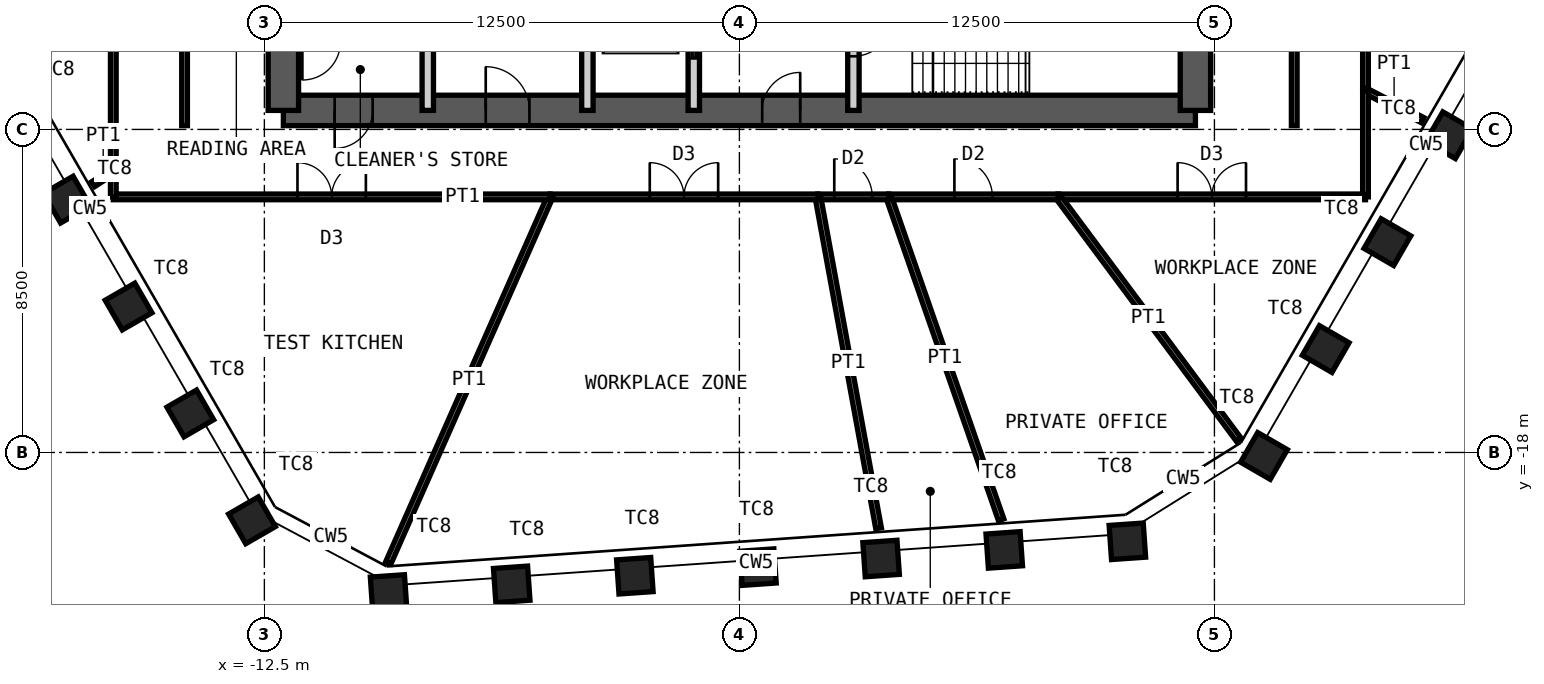
"""IFC4 building model, lengths in metres.
Left out: names, types, materials, properties, quantities, classifications, styles, units other than length and angle.
Written with IfcOpenShell. Run it as: python <this file> out.ifc"""

import sys

from ifc_helpers import new_model, si_unit, direction, frame, frame_2d, origin, origin_2d, place, context, subcontext, project, spatial, rectangle, hollow_rectangle, extrude, element, fill, save


model = new_model("IFC4")
c1 = context("Model", 3, precision=1e-05, world=origin(), true_north=direction((0.0, 1.0)))
c2 = subcontext(c1, "Body", "Model", "MODEL_VIEW")
j1 = project(units=[si_unit("LENGTHUNIT", "METRE"), si_unit("PLANEANGLEUNIT", "RADIAN")], contexts=[c1])
p1 = place(None, origin())
s1 = spatial("IfcSite", under=j1, at=p1, CompositionType="ELEMENT")
p2 = place(p1, origin())
s2 = spatial("IfcBuilding", under=s1, at=p2, CompositionType="ELEMENT")
p3 = place(p2, frame((0.0, 0.0, 312.4)))
s3 = spatial("IfcBuildingStorey", under=s2, at=p3, CompositionType="ELEMENT", Elevation=312.4)
for number, where, z_axis, x_axis in (
    (1, (18.676, -9.653, 0.0), (0.0, 0.0, 1.0), (0.5, 0.866, 0.0)),
    (2, (17.052, -12.466, 0.0), (0.0, 0.0, 1.0), (0.5, 0.866, 0.0)),
    (3, (15.427, -15.279, 0.0), (0.0, 0.0, 1.0), (0.5, 0.866, 0.0)),
    (4, (13.803, -18.092, 0.0), (0.0, 0.0, 1.0), (0.5, 0.866, 0.0)),
    (5, (10.209, -20.337, 0.0), (0.0, 0.0, 1.0), (0.998, 0.07, 0.0)),
    (6, (6.969, -20.564, 0.0), (0.0, 0.0, 1.0), (0.998, 0.07, 0.0)),
    (7, (3.729, -20.791, 0.0), (0.0, 0.0, 1.0), (0.998, 0.07, 0.0)),
    (8, (0.489, -21.017, 0.0), (0.0, 0.0, 1.0), (0.998, 0.07, 0.0)),
    (9, (-2.751, -21.244, 0.0), (0.0, 0.0, 1.0), (0.998, 0.07, 0.0)),
    (10, (-5.991, -21.47, 0.0), (0.0, 0.0, 1.0), (0.998, 0.07, 0.0)),
    (11, (-9.231, -21.697, 0.0), (0.0, 0.0, 1.0), (0.998, 0.07, 0.0)),
    (12, (-12.825, -19.786, 0.0), (0.0, 0.0, 1.0), (0.5, -0.866, 0.0)),
    (13, (-14.449, -16.973, 0.0), (0.0, 0.0, 1.0), (0.5, -0.866, 0.0)),
    (14, (-16.073, -14.16, 0.0), (0.0, 0.0, 1.0), (0.5, -0.866, 0.0)),
    (15, (-17.698, -11.347, 0.0), (0.0, 0.0, 1.0), (0.5, -0.866, 0.0)),
):
    element("IfcColumn", number, at=place(p3, frame(where, z_axis=z_axis, x_axis=x_axis)), inside=s3, PredefinedType="COLUMN", context=c2, shape_type="SweptSolid", body=[
        extrude(hollow_rectangle(XDim=0.9, YDim=0.9, WallThickness=0.05, at=origin_2d()), origin(), (0.0, 0.0, 1.0), 4.2),
    ])
p4 = place(p3, frame((-12.0, -9.0, 0.0), z_axis=(0.0, 0.0, 1.0), x_axis=(1.0, 0.0, 0.0)))
e16 = element("IfcWall", 16, at=p4, inside=s3, PredefinedType="SHEAR", context=c2, shape_type="SweptSolid", body=[
    extrude(rectangle(XDim=24.0, YDim=0.8, at=frame_2d((12.0, 0.0))), origin(), (0.0, 0.0, 1.0), 4.2),
])
p5 = place(p4, frame((1.35, 0.0, 0.0)))
e17 = element("IfcOpeningElement", 17, at=p5, cuts=e16, PredefinedType="OPENING", context=c2, shape_type="SweptSolid", body=[
    extrude(rectangle(XDim=1.0, YDim=2.1, at=frame_2d((0.5, 1.05))), frame((0.0, 0.41, 0.0), z_axis=(0.0, -1.0, 0.0), x_axis=(1.0, 0.0, 0.0)), (0.0, 0.0, 1.0), 0.82),
])
p6 = place(p4, frame((5.325, 0.0, 0.0)))
e18 = element("IfcOpeningElement", 18, at=p6, cuts=e16, PredefinedType="OPENING", context=c2, shape_type="SweptSolid", body=[
    extrude(rectangle(XDim=1.15, YDim=2.1, at=frame_2d((0.575, 1.05))), frame((0.0, 0.41, 0.0), z_axis=(0.0, -1.0, 0.0), x_axis=(1.0, 0.0, 0.0)), (0.0, 0.0, 1.0), 0.82),
])
p7 = place(p4, frame((12.6, 0.0, 0.0)))
e19 = element("IfcOpeningElement", 19, at=p7, cuts=e16, PredefinedType="OPENING", context=c2, shape_type="SweptSolid", body=[
    extrude(rectangle(XDim=1.0, YDim=2.1, at=frame_2d((0.5, 1.05))), frame((0.0, 0.41, 0.0), z_axis=(0.0, -1.0, 0.0), x_axis=(1.0, 0.0, 0.0)), (0.0, 0.0, 1.0), 0.82),
])
p8 = place(p3, frame((12.0, -9.0, 0.0), z_axis=(0.0, 0.0, 1.0), x_axis=(0.0, 1.0, 0.0)))
e20 = element("IfcWall", 20, at=p8, inside=s3, PredefinedType="SHEAR", context=c2, shape_type="SweptSolid", body=[
    extrude(rectangle(XDim=18.0, YDim=0.8, at=frame_2d((9.0, 0.0))), origin(), (0.0, 0.0, 1.0), 4.2),
])
p9 = place(p8, frame((8.1, 0.0, 0.0)))
e21 = element("IfcOpeningElement", 21, at=p9, cuts=e20, PredefinedType="OPENING", context=c2, shape_type="SweptSolid", body=[
    extrude(rectangle(XDim=1.8, YDim=2.1, at=frame_2d((0.9, 1.05))), frame((0.0, 0.41, 0.0), z_axis=(0.0, -1.0, 0.0), x_axis=(1.0, 0.0, 0.0)), (0.0, 0.0, 1.0), 0.82),
])
p10 = place(p3, frame((-12.0, -9.0, 0.0), z_axis=(0.0, 0.0, 1.0), x_axis=(0.0, 1.0, 0.0)))
e22 = element("IfcWall", 22, at=p10, inside=s3, PredefinedType="SHEAR", context=c2, shape_type="SweptSolid", body=[
    extrude(rectangle(XDim=18.0, YDim=0.8, at=frame_2d((9.0, 0.0))), origin(), (0.0, 0.0, 1.0), 4.2),
])
p11 = place(p10, frame((8.1, 0.0, 0.0)))
e23 = element("IfcOpeningElement", 23, at=p11, cuts=e22, PredefinedType="OPENING", context=c2, shape_type="SweptSolid", body=[
    extrude(rectangle(XDim=1.8, YDim=2.1, at=frame_2d((0.9, 1.05))), frame((0.0, 0.41, 0.0), z_axis=(0.0, -1.0, 0.0), x_axis=(1.0, 0.0, 0.0)), (0.0, 0.0, 1.0), 0.82),
])
for number, where, z_axis, x_axis in (
    (24, (-8.2, -9.0, 0.0), (0.0, 0.0, 1.0), (0.0, 1.0, 0.0)),
    (25, (-4.0, -9.0, 0.0), (0.0, 0.0, 1.0), (0.0, 1.0, 0.0)),
):
    element("IfcWall", number, at=place(p3, frame(where, z_axis=z_axis, x_axis=x_axis)), inside=s3, PredefinedType="PARTITIONING", context=c2, shape_type="SweptSolid", body=[
        extrude(rectangle(XDim=3.85, YDim=0.3, at=frame_2d((1.925, 0.0))), origin(), (0.0, 0.0, 1.0), 3.98),
    ])
p12 = place(p3, frame((-1.2, -9.0, 0.0), z_axis=(0.0, 0.0, 1.0), x_axis=(0.0, 1.0, 0.0)))
e26 = element("IfcWall", 26, at=p12, inside=s3, PredefinedType="PARTITIONING", context=c2, shape_type="SweptSolid", body=[
    extrude(rectangle(XDim=3.85, YDim=0.3, at=frame_2d((1.925, 0.0))), origin(), (0.0, 0.0, 1.0), 3.98),
])
p13 = place(p12, frame((1.375, 0.0, 0.0)))
e27 = element("IfcOpeningElement", 27, at=p13, cuts=e26, PredefinedType="OPENING", context=c2, shape_type="SweptSolid", body=[
    extrude(rectangle(XDim=1.1, YDim=2.4, at=frame_2d((0.55, 1.2))), frame((0.0, 0.16, 0.0), z_axis=(0.0, -1.0, 0.0), x_axis=(1.0, 0.0, 0.0)), (0.0, 0.0, 1.0), 0.32),
])
p14 = place(p3, frame((3.0, -9.0, 0.0), z_axis=(0.0, 0.0, 1.0), x_axis=(0.0, 1.0, 0.0)))
e28 = element("IfcWall", 28, at=p14, inside=s3, PredefinedType="PARTITIONING", context=c2, shape_type="SweptSolid", body=[
    extrude(rectangle(XDim=3.85, YDim=0.3, at=frame_2d((1.925, 0.0))), origin(), (0.0, 0.0, 1.0), 3.98),
])
p15 = place(p14, frame((1.425, 0.0, 0.0)))
e29 = element("IfcOpeningElement", 29, at=p15, cuts=e28, PredefinedType="OPENING", context=c2, shape_type="SweptSolid", body=[
    extrude(rectangle(XDim=1.0, YDim=2.1, at=frame_2d((0.5, 1.05))), frame((0.0, 0.16, 0.0), z_axis=(0.0, -1.0, 0.0), x_axis=(1.0, 0.0, 0.0)), (0.0, 0.0, 1.0), 0.32),
])
p16 = place(p3, frame((16.475, 1.777, 0.0), z_axis=(0.0, 0.0, 1.0), x_axis=(0.0, -1.0, 0.0)))
e30 = element("IfcWall", 30, at=p16, inside=s3, PredefinedType="PARTITIONING", context=c2, shape_type="SweptSolid", body=[
    extrude(rectangle(XDim=10.259, YDim=0.15, at=frame_2d((5.13, 0.0))), origin(), (0.0, 0.0, 1.0), 4.03),
])
p17 = place(p16, frame((4.23, 0.0, 0.0)))
e31 = element("IfcOpeningElement", 31, at=p17, cuts=e30, PredefinedType="OPENING", context=c2, shape_type="SweptSolid", body=[
    extrude(rectangle(XDim=1.8, YDim=2.4, at=frame_2d((0.9, 1.2))), frame((0.0, 0.085, 0.0), z_axis=(0.0, -1.0, 0.0), x_axis=(1.0, 0.0, 0.0)), (0.0, 0.0, 1.0), 0.17),
])
p18 = place(p3, frame((17.98, -9.257, 0.0), z_axis=(0.0, 0.0, 1.0), x_axis=(-0.889058145064, 0.457794292991, 0.0)))
e32 = element("IfcWall", 32, at=p18, inside=s3, PredefinedType="PARTITIONING", context=c2, shape_type="SweptSolid", body=[
    extrude(rectangle(XDim=1.693, YDim=0.15, at=frame_2d((0.847, 0.0))), origin(), (0.0, 0.0, 1.0), 3.33),
])
p19 = place(p3, frame((16.475, -8.482, 0.0), z_axis=(0.0, 0.0, 1.0), x_axis=(0.0, -1.0, 0.0)))
e33 = element("IfcWall", 33, at=p19, inside=s3, PredefinedType="PARTITIONING", context=c2, shape_type="SweptSolid", body=[
    extrude(rectangle(XDim=2.793, YDim=0.15, at=frame_2d((1.396, 0.0))), origin(), (0.0, 0.0, 1.0), 4.03),
])
p20 = place(p3, frame((16.475, -11.275, 0.0), z_axis=(0.0, 0.0, 1.0), x_axis=(-1.0, 0.0, 0.0)))
e34 = element("IfcWall", 34, at=p20, inside=s3, PredefinedType="PARTITIONING", context=c2, shape_type="SweptSolid", body=[
    extrude(rectangle(XDim=8.088, YDim=0.15, at=frame_2d((4.044, 0.0))), origin(), (0.0, 0.0, 1.0), 4.03),
])
p21 = place(p20, frame((3.144, 0.0, 0.0)))
e35 = element("IfcOpeningElement", 35, at=p21, cuts=e34, PredefinedType="OPENING", context=c2, shape_type="SweptSolid", body=[
    extrude(rectangle(XDim=1.8, YDim=2.4, at=frame_2d((0.9, 1.2))), frame((0.0, 0.085, 0.0), z_axis=(0.0, -1.0, 0.0), x_axis=(1.0, 0.0, 0.0)), (0.0, 0.0, 1.0), 0.17),
])
p22 = place(p3, frame((13.138, -17.661, 0.0), z_axis=(0.0, 0.0, 1.0), x_axis=(-0.596829877953, 0.802367806422, 0.0)))
e36 = element("IfcWall", 36, at=p22, inside=s3, PredefinedType="PARTITIONING", context=c2, shape_type="SweptSolid", body=[
    extrude(rectangle(XDim=7.959, YDim=0.15, at=frame_2d((3.98, 0.0))), origin(), (0.0, 0.0, 1.0), 2.93),
])
p23 = place(p3, frame((8.387, -11.275, 0.0), z_axis=(0.0, 0.0, 1.0), x_axis=(-1.0, 0.0, 0.0)))
e37 = element("IfcWall", 37, at=p23, inside=s3, PredefinedType="PARTITIONING", context=c2, shape_type="SweptSolid", body=[
    extrude(rectangle(XDim=4.459, YDim=0.15, at=frame_2d((2.23, 0.0))), origin(), (0.0, 0.0, 1.0), 4.03),
])
p24 = place(p23, frame((1.73, 0.0, 0.0)))
e38 = element("IfcOpeningElement", 38, at=p24, cuts=e37, PredefinedType="OPENING", context=c2, shape_type="SweptSolid", body=[
    extrude(rectangle(XDim=1.0, YDim=2.4, at=frame_2d((0.5, 1.2))), frame((0.0, 0.085, 0.0), z_axis=(0.0, -1.0, 0.0), x_axis=(1.0, 0.0, 0.0)), (0.0, 0.0, 1.0), 0.17),
])
p25 = place(p3, frame((6.888, -19.771, 0.0), z_axis=(0.0, 0.0, 1.0), x_axis=(-0.328987878601, 0.944334144111, 0.0)))
e39 = element("IfcWall", 39, at=p25, inside=s3, PredefinedType="PARTITIONING", context=c2, shape_type="SweptSolid", body=[
    extrude(rectangle(XDim=8.997, YDim=0.15, at=frame_2d((4.499, 0.0))), origin(), (0.0, 0.0, 1.0), 3.33),
])
p26 = place(p3, frame((3.928, -11.275, 0.0), z_axis=(0.0, 0.0, 1.0), x_axis=(-1.0, 0.0, 0.0)))
e40 = element("IfcWall", 40, at=p26, inside=s3, PredefinedType="PARTITIONING", context=c2, shape_type="SweptSolid", body=[
    extrude(rectangle(XDim=1.863, YDim=0.15, at=frame_2d((0.931, 0.0))), origin(), (0.0, 0.0, 1.0), 4.03),
])
p27 = place(p26, frame((0.431, 0.0, 0.0)))
e41 = element("IfcOpeningElement", 41, at=p27, cuts=e40, PredefinedType="OPENING", context=c2, shape_type="SweptSolid", body=[
    extrude(rectangle(XDim=1.0, YDim=2.4, at=frame_2d((0.5, 1.2))), frame((0.0, 0.085, 0.0), z_axis=(0.0, -1.0, 0.0), x_axis=(1.0, 0.0, 0.0)), (0.0, 0.0, 1.0), 0.17),
])
p28 = place(p3, frame((3.662, -19.994, 0.0), z_axis=(0.0, 0.0, 1.0), x_axis=(-0.180184416856, 0.983632846098, 0.0)))
e42 = element("IfcWall", 42, at=p28, inside=s3, PredefinedType="PARTITIONING", context=c2, shape_type="SweptSolid", body=[
    extrude(rectangle(XDim=8.864, YDim=0.15, at=frame_2d((4.432, 0.0))), origin(), (0.0, 0.0, 1.0), 3.33),
])
p29 = place(p3, frame((2.065, -11.275, 0.0), z_axis=(0.0, 0.0, 1.0), x_axis=(-1.0, 0.0, 0.0)))
e43 = element("IfcWall", 43, at=p29, inside=s3, PredefinedType="PARTITIONING", context=c2, shape_type="SweptSolid", body=[
    extrude(rectangle(XDim=7.048, YDim=0.15, at=frame_2d((3.524, 0.0))), origin(), (0.0, 0.0, 1.0), 4.03),
])
p30 = place(p29, frame((2.624, 0.0, 0.0)))
e44 = element("IfcOpeningElement", 44, at=p30, cuts=e43, PredefinedType="OPENING", context=c2, shape_type="SweptSolid", body=[
    extrude(rectangle(XDim=1.8, YDim=2.4, at=frame_2d((0.9, 1.2))), frame((0.0, 0.085, 0.0), z_axis=(0.0, -1.0, 0.0), x_axis=(1.0, 0.0, 0.0)), (0.0, 0.0, 1.0), 0.17),
])
p31 = place(p3, frame((-9.24, -20.907, 0.0), z_axis=(0.0, 0.0, 1.0), x_axis=(0.404227449851, 0.91465849845, 0.0)))
e45 = element("IfcWall", 45, at=p31, inside=s3, PredefinedType="PARTITIONING", context=c2, shape_type="SweptSolid", body=[
    extrude(rectangle(XDim=10.531, YDim=0.15, at=frame_2d((5.265, 0.0))), origin(), (0.0, 0.0, 1.0), 2.93),
])
p32 = place(p3, frame((-4.983, -11.275, 0.0), z_axis=(0.0, 0.0, 1.0), x_axis=(-1.0, 0.0, 0.0)))
e46 = element("IfcWall", 46, at=p32, inside=s3, PredefinedType="PARTITIONING", context=c2, shape_type="SweptSolid", body=[
    extrude(rectangle(XDim=11.492, YDim=0.15, at=frame_2d((5.746, 0.0))), origin(), (0.0, 0.0, 1.0), 4.03),
])
p33 = place(p32, frame((4.846, 0.0, 0.0)))
e47 = element("IfcOpeningElement", 47, at=p33, cuts=e46, PredefinedType="OPENING", context=c2, shape_type="SweptSolid", body=[
    extrude(rectangle(XDim=1.8, YDim=2.4, at=frame_2d((0.9, 1.2))), frame((0.0, 0.085, 0.0), z_axis=(0.0, -1.0, 0.0), x_axis=(1.0, 0.0, 0.0)), (0.0, 0.0, 1.0), 0.17),
])
p34 = place(p3, frame((-16.475, -11.275, 0.0), z_axis=(0.0, 0.0, 1.0), x_axis=(0.0, 1.0, 0.0)))
e48 = element("IfcWall", 48, at=p34, inside=s3, PredefinedType="PARTITIONING", context=c2, shape_type="SweptSolid", body=[
    extrude(rectangle(XDim=0.674, YDim=0.15, at=frame_2d((0.337, 0.0))), origin(), (0.0, 0.0, 1.0), 4.03),
])
p35 = place(p3, frame((-17.007, -10.943, 0.0), z_axis=(0.0, 0.0, 1.0), x_axis=(0.840789611822, 0.541362012568, 0.0)))
e49 = element("IfcWall", 49, at=p35, inside=s3, PredefinedType="PARTITIONING", context=c2, shape_type="SweptSolid", body=[
    extrude(rectangle(XDim=0.633, YDim=0.15, at=frame_2d((0.316, 0.0))), origin(), (0.0, 0.0, 1.0), 3.33),
])
p36 = place(p3, frame((-16.475, -10.601, 0.0), z_axis=(0.0, 0.0, 1.0), x_axis=(0.0, 1.0, 0.0)))
e50 = element("IfcWall", 50, at=p36, inside=s3, PredefinedType="PARTITIONING", context=c2, shape_type="SweptSolid", body=[
    extrude(rectangle(XDim=8.681, YDim=0.15, at=frame_2d((4.341, 0.0))), origin(), (0.0, 0.0, 1.0), 4.03),
])
p37 = place(p36, frame((3.441, 0.0, 0.0)))
e51 = element("IfcOpeningElement", 51, at=p37, cuts=e50, PredefinedType="OPENING", context=c2, shape_type="SweptSolid", body=[
    extrude(rectangle(XDim=1.8, YDim=2.4, at=frame_2d((0.9, 1.2))), frame((0.0, 0.085, 0.0), z_axis=(0.0, -1.0, 0.0), x_axis=(1.0, 0.0, 0.0)), (0.0, 0.0, 1.0), 0.17),
])
for number, where, z_axis, x_axis in (
    (52, (14.6, -9.4, 0.0), (0.0, 0.0, 1.0), (0.0, 1.0, 0.0)),
    (53, (-14.6, -9.4, 0.0), (0.0, 0.0, 1.0), (0.0, 1.0, 0.0)),
):
    element("IfcWall", number, at=place(p3, frame(where, z_axis=z_axis, x_axis=x_axis)), inside=s3, PredefinedType="PARTITIONING", context=c2, shape_type="SweptSolid", body=[
        extrude(rectangle(XDim=6.9, YDim=0.15, at=frame_2d((3.45, 0.0))), origin(), (0.0, 0.0, 1.0), 4.03),
    ])
p38 = place(p5, origin())
e54 = element("IfcDoor", 54, at=p38, inside=s3, OperationType="SINGLE_SWING_LEFT", PredefinedType="DOOR", context=c2, shape_type="SweptSolid", body=[
    extrude(rectangle(XDim=1.0, YDim=2.1, at=frame_2d((0.5, 1.05))), frame((0.0, 0.025, 0.0), z_axis=(0.0, -1.0, 0.0), x_axis=(1.0, 0.0, 0.0)), (0.0, 0.0, 1.0), 0.05),
])
fill(e17, e54)
p39 = place(p6, origin())
e55 = element("IfcDoor", 55, at=p39, inside=s3, OperationType="SINGLE_SWING_RIGHT", PredefinedType="DOOR", context=c2, shape_type="SweptSolid", body=[
    extrude(rectangle(XDim=1.15, YDim=2.1, at=frame_2d((0.575, 1.05))), frame((0.0, 0.025, 0.0), z_axis=(0.0, -1.0, 0.0), x_axis=(1.0, 0.0, 0.0)), (0.0, 0.0, 1.0), 0.05),
])
fill(e18, e55)
p40 = place(p7, origin())
e56 = element("IfcDoor", 56, at=p40, inside=s3, OperationType="SINGLE_SWING_LEFT", PredefinedType="DOOR", context=c2, shape_type="SweptSolid", body=[
    extrude(rectangle(XDim=1.0, YDim=2.1, at=frame_2d((0.5, 1.05))), frame((0.0, 0.025, 0.0), z_axis=(0.0, -1.0, 0.0), x_axis=(1.0, 0.0, 0.0)), (0.0, 0.0, 1.0), 0.05),
])
fill(e19, e56)
p41 = place(p15, origin())
e57 = element("IfcDoor", 57, at=p41, inside=s3, OperationType="SINGLE_SWING_RIGHT", PredefinedType="DOOR", context=c2, shape_type="SweptSolid", body=[
    extrude(rectangle(XDim=1.0, YDim=2.1, at=frame_2d((0.5, 1.05))), frame((0.0, 0.025, 0.0), z_axis=(0.0, -1.0, 0.0), x_axis=(1.0, 0.0, 0.0)), (0.0, 0.0, 1.0), 0.05),
])
fill(e29, e57)
p42 = place(p13, origin())
e58 = element("IfcDoor", 58, at=p42, inside=s3, OperationType="DOUBLE_DOOR_SLIDING", PredefinedType="DOOR", context=c2, shape_type="SweptSolid", body=[
    extrude(rectangle(XDim=1.1, YDim=2.4, at=frame_2d((0.55, 1.2))), frame((0.0, 0.025, 0.0), z_axis=(0.0, -1.0, 0.0), x_axis=(1.0, 0.0, 0.0)), (0.0, 0.0, 1.0), 0.05),
])
fill(e27, e58)
p43 = place(p21, origin())
e59 = element("IfcDoor", 59, at=p43, inside=s3, OperationType="DOUBLE_DOOR_DOUBLE_SWING", PredefinedType="DOOR", context=c2, shape_type="SweptSolid", body=[
    extrude(rectangle(XDim=1.8, YDim=2.4, at=frame_2d((0.9, 1.2))), frame((0.0, 0.025, 0.0), z_axis=(0.0, -1.0, 0.0), x_axis=(1.0, 0.0, 0.0)), (0.0, 0.0, 1.0), 0.05),
])
fill(e35, e59)
p44 = place(p24, origin())
e60 = element("IfcDoor", 60, at=p44, inside=s3, OperationType="SINGLE_SWING_RIGHT", PredefinedType="DOOR", context=c2, shape_type="SweptSolid", body=[
    extrude(rectangle(XDim=1.0, YDim=2.4, at=frame_2d((0.5, 1.2))), frame((0.0, 0.025, 0.0), z_axis=(0.0, -1.0, 0.0), x_axis=(1.0, 0.0, 0.0)), (0.0, 0.0, 1.0), 0.05),
])
fill(e38, e60)
p45 = place(p27, origin())
e61 = element("IfcDoor", 61, at=p45, inside=s3, OperationType="SINGLE_SWING_RIGHT", PredefinedType="DOOR", context=c2, shape_type="SweptSolid", body=[
    extrude(rectangle(XDim=1.0, YDim=2.4, at=frame_2d((0.5, 1.2))), frame((0.0, 0.025, 0.0), z_axis=(0.0, -1.0, 0.0), x_axis=(1.0, 0.0, 0.0)), (0.0, 0.0, 1.0), 0.05),
])
fill(e41, e61)
p46 = place(p30, origin())
e62 = element("IfcDoor", 62, at=p46, inside=s3, OperationType="DOUBLE_DOOR_DOUBLE_SWING", PredefinedType="DOOR", context=c2, shape_type="SweptSolid", body=[
    extrude(rectangle(XDim=1.8, YDim=2.4, at=frame_2d((0.9, 1.2))), frame((0.0, 0.025, 0.0), z_axis=(0.0, -1.0, 0.0), x_axis=(1.0, 0.0, 0.0)), (0.0, 0.0, 1.0), 0.05),
])
fill(e44, e62)
p47 = place(p33, origin())
e63 = element("IfcDoor", 63, at=p47, inside=s3, OperationType="DOUBLE_DOOR_DOUBLE_SWING", PredefinedType="DOOR", context=c2, shape_type="SweptSolid", body=[
    extrude(rectangle(XDim=1.8, YDim=2.4, at=frame_2d((0.9, 1.2))), frame((0.0, 0.025, 0.0), z_axis=(0.0, -1.0, 0.0), x_axis=(1.0, 0.0, 0.0)), (0.0, 0.0, 1.0), 0.05),
])
fill(e47, e63)
save(model, sys.argv[1])
